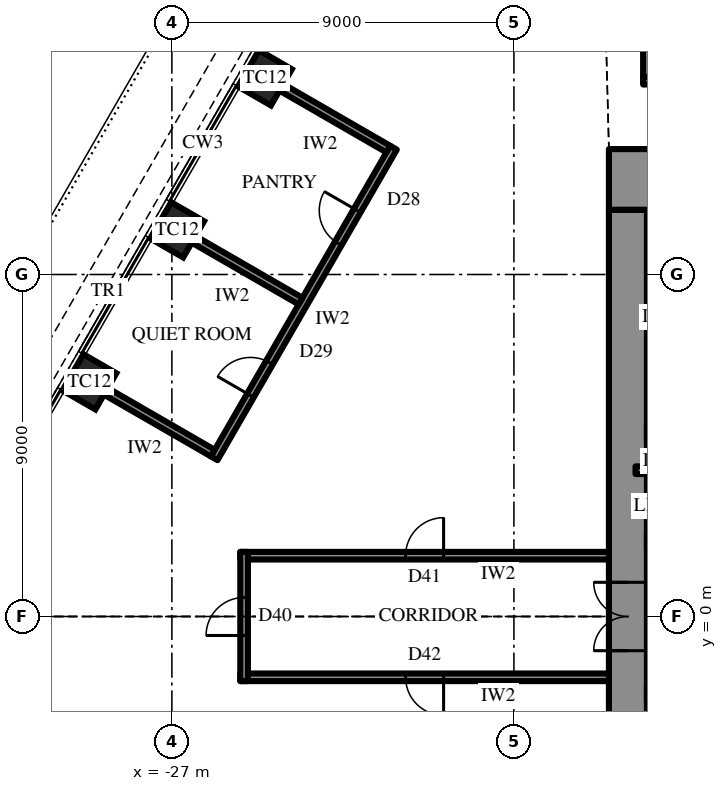
"""IFC4 building model, lengths in metres.
Left out: names, types, materials, properties, quantities, classifications, styles, units other than length and angle.
Written with IfcOpenShell. Run it as: python <this file> out.ifc"""

import sys

from ifc_helpers import new_model, si_unit, direction, frame, frame_2d, origin, origin_2d, place, context, subcontext, project, spatial, rectangle, extrude, element, fill, save


model = new_model("IFC4")
c1 = context("Model", 3, precision=1e-05, world=origin(), true_north=direction((0.0, 1.0)))
c2 = subcontext(c1, "Body", "Model", "MODEL_VIEW")
j1 = project(units=[si_unit("LENGTHUNIT", "METRE"), si_unit("PLANEANGLEUNIT", "RADIAN")], contexts=[c1])
p1 = place(None, origin())
s1 = spatial("IfcSite", under=j1, at=p1, CompositionType="ELEMENT")
p2 = place(p1, origin())
s2 = spatial("IfcBuilding", under=s1, at=p2, CompositionType="ELEMENT")
p3 = place(p2, frame((0.0, 0.0, 282.7)))
s3 = spatial("IfcBuildingStorey", under=s2, at=p3, CompositionType="ELEMENT", Elevation=282.7)
for number, where, z_axis, x_axis in (
    (1, (-24.552, 14.175, 0.0), (0.0, 0.0, 1.0), (-0.5, -0.866, 0.0)),
    (2, (-26.861, 10.175, 0.0), (0.0, 0.0, 1.0), (-0.5, -0.866, 0.0)),
    (3, (-29.171, 6.175, 0.0), (0.0, 0.0, 1.0), (-0.5, -0.866, 0.0)),
):
    element("IfcColumn", number, at=place(p3, frame(where, z_axis=z_axis, x_axis=x_axis)), inside=s3, PredefinedType="COLUMN", context=c2, shape_type="SweptSolid", body=[
        extrude(rectangle(XDim=1.1, YDim=1.0, at=origin_2d()), origin(), (0.0, 0.0, 1.0), 4.2),
    ])
p4 = place(p3, frame((-15.5, 11.5, 0.0), z_axis=(0.0, 0.0, 1.0), x_axis=(1.0, 0.0, 0.0)))
e4 = element("IfcWall", 4, at=p4, inside=s3, PredefinedType="SHEAR", context=c2, shape_type="SweptSolid", body=[
    extrude(rectangle(XDim=31.0, YDim=1.6, at=frame_2d((15.5, 0.0))), origin(), (0.0, 0.0, 1.0), 4.2),
])
p5 = place(p4, frame((16.35, 0.0, 0.0)))
e5 = element("IfcOpeningElement", 5, at=p5, cuts=e4, PredefinedType="OPENING", context=c2, shape_type="SweptSolid", body=[
    extrude(rectangle(XDim=0.9, YDim=2.2, at=frame_2d((0.45, 1.1))), frame((0.0, 0.81, 0.0), z_axis=(0.0, -1.0, 0.0), x_axis=(1.0, 0.0, 0.0)), (0.0, 0.0, 1.0), 1.62),
])
p6 = place(p4, frame((19.35, 0.0, 0.0)))
e6 = element("IfcOpeningElement", 6, at=p6, cuts=e4, PredefinedType="OPENING", context=c2, shape_type="SweptSolid", body=[
    extrude(rectangle(XDim=0.9, YDim=2.2, at=frame_2d((0.45, 1.1))), frame((0.0, 0.81, 0.0), z_axis=(0.0, -1.0, 0.0), x_axis=(1.0, 0.0, 0.0)), (0.0, 0.0, 1.0), 1.62),
])
p7 = place(p4, frame((22.4, 0.0, 0.0)))
e7 = element("IfcOpeningElement", 7, at=p7, cuts=e4, PredefinedType="OPENING", context=c2, shape_type="SweptSolid", body=[
    extrude(rectangle(XDim=1.0, YDim=2.2, at=frame_2d((0.5, 1.1))), frame((0.0, 0.81, 0.0), z_axis=(0.0, -1.0, 0.0), x_axis=(1.0, 0.0, 0.0)), (0.0, 0.0, 1.0), 1.62),
])
p8 = place(p4, frame((1.65, 0.0, 0.0)))
e8 = element("IfcOpeningElement", 8, at=p8, cuts=e4, PredefinedType="OPENING", context=c2, shape_type="SweptSolid", body=[
    extrude(rectangle(XDim=0.9, YDim=2.2, at=frame_2d((0.45, 1.1))), frame((0.0, 0.81, 0.0), z_axis=(0.0, -1.0, 0.0), x_axis=(1.0, 0.0, 0.0)), (0.0, 0.0, 1.0), 1.62),
])
p9 = place(p4, frame((4.65, 0.0, 0.0)))
e9 = element("IfcOpeningElement", 9, at=p9, cuts=e4, PredefinedType="OPENING", context=c2, shape_type="SweptSolid", body=[
    extrude(rectangle(XDim=0.9, YDim=2.2, at=frame_2d((0.45, 1.1))), frame((0.0, 0.81, 0.0), z_axis=(0.0, -1.0, 0.0), x_axis=(1.0, 0.0, 0.0)), (0.0, 0.0, 1.0), 1.62),
])
p10 = place(p4, frame((25.45, 0.0, 0.0)))
e10 = element("IfcOpeningElement", 10, at=p10, cuts=e4, PredefinedType="OPENING", context=c2, shape_type="SweptSolid", body=[
    extrude(rectangle(XDim=0.9, YDim=2.2, at=frame_2d((0.45, 1.1))), frame((0.0, 0.81, 0.0), z_axis=(0.0, -1.0, 0.0), x_axis=(1.0, 0.0, 0.0)), (0.0, 0.0, 1.0), 1.62),
])
p11 = place(p4, frame((28.45, 0.0, 0.0)))
e11 = element("IfcOpeningElement", 11, at=p11, cuts=e4, PredefinedType="OPENING", context=c2, shape_type="SweptSolid", body=[
    extrude(rectangle(XDim=0.9, YDim=2.2, at=frame_2d((0.45, 1.1))), frame((0.0, 0.81, 0.0), z_axis=(0.0, -1.0, 0.0), x_axis=(1.0, 0.0, 0.0)), (0.0, 0.0, 1.0), 1.62),
])
p12 = place(p3, frame((-15.0, 10.7, 0.0), z_axis=(0.0, 0.0, 1.0), x_axis=(0.0, -1.0, 0.0)))
e12 = element("IfcWall", 12, at=p12, inside=s3, PredefinedType="SHEAR", context=c2, shape_type="SweptSolid", body=[
    extrude(rectangle(XDim=21.4, YDim=1.0, at=frame_2d((10.7, 0.0))), origin(), (0.0, 0.0, 1.0), 4.2),
])
p13 = place(p12, frame((9.8, 0.0, 0.0)))
e13 = element("IfcOpeningElement", 13, at=p13, cuts=e12, PredefinedType="OPENING", context=c2, shape_type="SweptSolid", body=[
    extrude(rectangle(XDim=1.8, YDim=2.4, at=frame_2d((0.9, 1.2))), frame((0.0, 0.51, 0.0), z_axis=(0.0, -1.0, 0.0), x_axis=(1.0, 0.0, 0.0)), (0.0, 0.0, 1.0), 1.02),
])
p14 = place(p3, frame((-12.3, -2.0, 0.0), z_axis=(0.0, 0.0, 1.0), x_axis=(-1.0, 0.0, 0.0)))
e14 = element("IfcWall", 14, at=p14, inside=s3, PredefinedType="SHEAR", context=c2, shape_type="SweptSolid", body=[
    extrude(rectangle(XDim=2.2, YDim=0.5, at=frame_2d((1.1, 0.0))), origin(), (0.0, 0.0, 1.0), 4.2),
])
p15 = place(p14, frame((0.8, 0.0, 0.0)))
e15 = element("IfcOpeningElement", 15, at=p15, cuts=e14, PredefinedType="OPENING", context=c2, shape_type="SweptSolid", body=[
    extrude(rectangle(XDim=0.9, YDim=2.2, at=frame_2d((0.45, 1.1))), frame((0.0, 0.26, 0.0), z_axis=(0.0, -1.0, 0.0), x_axis=(1.0, 0.0, 0.0)), (0.0, 0.0, 1.0), 0.52),
])
p16 = place(p3, frame((-14.8, 3.85, 0.0), z_axis=(0.0, 0.0, 1.0), x_axis=(1.0, 0.0, 0.0)))
e16 = element("IfcWall", 16, at=p16, inside=s3, PredefinedType="PARTITIONING", context=c2, shape_type="SweptSolid", body=[
    extrude(rectangle(XDim=2.5, YDim=0.2, at=frame_2d((1.25, 0.0))), origin(), (0.0, 0.0, 1.0), 4.0),
])
p17 = place(p3, frame((-14.6, 14.1, 0.0), z_axis=(0.0, 0.0, 1.0), x_axis=(1.0, 0.0, 0.0)))
e17 = element("IfcWall", 17, at=p17, inside=s3, PredefinedType="PARTITIONING", context=c2, shape_type="SweptSolid", body=[
    extrude(rectangle(XDim=29.2, YDim=0.2, at=frame_2d((14.6, 0.0))), origin(), (0.0, 0.0, 1.0), 4.0),
])
p18 = place(p3, frame((-14.5, 14.2, 0.0), z_axis=(0.0, 0.0, 1.0), x_axis=(0.0, 1.0, 0.0)))
e18 = element("IfcWall", 18, at=p18, inside=s3, PredefinedType="PARTITIONING", context=c2, shape_type="SweptSolid", body=[
    extrude(rectangle(XDim=3.8, YDim=0.2, at=frame_2d((1.9, 0.0))), origin(), (0.0, 0.0, 1.0), 4.0),
])
p19 = place(p3, frame((-21.168, 12.337, 0.0), z_axis=(0.0, 0.0, 1.0), x_axis=(-0.499989672313, -0.866031366395, 0.0)))
e19 = element("IfcWall", 19, at=p19, inside=s3, PredefinedType="PARTITIONING", context=c2, shape_type="SweptSolid", body=[
    extrude(rectangle(XDim=9.438, YDim=0.2, at=frame_2d((4.719, 0.0))), origin(), (0.0, 0.0, 1.0), 4.0),
])
p20 = place(p19, frame((1.909, 0.0, 0.0)))
e20 = element("IfcOpeningElement", 20, at=p20, cuts=e19, PredefinedType="OPENING", context=c2, shape_type="SweptSolid", body=[
    extrude(rectangle(XDim=1.0, YDim=2.2, at=frame_2d((0.5, 1.1))), frame((0.0, 0.11, 0.0), z_axis=(0.0, -1.0, 0.0), x_axis=(1.0, 0.0, 0.0)), (0.0, 0.0, 1.0), 0.22),
])
p21 = place(p19, frame((6.528, 0.0, 0.0)))
e21 = element("IfcOpeningElement", 21, at=p21, cuts=e19, PredefinedType="OPENING", context=c2, shape_type="SweptSolid", body=[
    extrude(rectangle(XDim=1.0, YDim=2.2, at=frame_2d((0.5, 1.1))), frame((0.0, 0.11, 0.0), z_axis=(0.0, -1.0, 0.0), x_axis=(1.0, 0.0, 0.0)), (0.0, 0.0, 1.0), 0.22),
])
for number, where, z_axis, x_axis in (
    (22, (-21.304, 12.3, 0.0), (0.0, 0.0, 1.0), (-0.866, 0.5, 0.0)),
    (23, (-23.614, 8.3, 0.0), (0.0, 0.0, 1.0), (-0.866, 0.5, 0.0)),
    (24, (-25.923, 4.3, 0.0), (0.0, 0.0, 1.0), (-0.866, 0.5, 0.0)),
):
    element("IfcWall", number, at=place(p3, frame(where, z_axis=z_axis, x_axis=x_axis)), inside=s3, PredefinedType="PARTITIONING", context=c2, shape_type="SweptSolid", body=[
        extrude(rectangle(XDim=3.25, YDim=0.2, at=frame_2d((1.625, 0.0))), origin(), (0.0, 0.0, 1.0), 3.082),
    ])
p22 = place(p3, frame((-15.5, 1.6, 0.0), z_axis=(0.0, 0.0, 1.0), x_axis=(-1.0, 0.0, 0.0)))
e25 = element("IfcWall", 25, at=p22, inside=s3, PredefinedType="PARTITIONING", context=c2, shape_type="SweptSolid", body=[
    extrude(rectangle(XDim=9.7, YDim=0.2, at=frame_2d((4.85, 0.0))), origin(), (0.0, 0.0, 1.0), 4.0),
])
p23 = place(p22, frame((4.35, 0.0, 0.0)))
e26 = element("IfcOpeningElement", 26, at=p23, cuts=e25, PredefinedType="OPENING", context=c2, shape_type="SweptSolid", body=[
    extrude(rectangle(XDim=1.0, YDim=2.2, at=frame_2d((0.5, 1.1))), frame((0.0, 0.11, 0.0), z_axis=(0.0, -1.0, 0.0), x_axis=(1.0, 0.0, 0.0)), (0.0, 0.0, 1.0), 0.22),
])
p24 = place(p3, frame((-15.5, -1.6, 0.0), z_axis=(0.0, 0.0, 1.0), x_axis=(-1.0, 0.0, 0.0)))
e27 = element("IfcWall", 27, at=p24, inside=s3, PredefinedType="PARTITIONING", context=c2, shape_type="SweptSolid", body=[
    extrude(rectangle(XDim=9.7, YDim=0.2, at=frame_2d((4.85, 0.0))), origin(), (0.0, 0.0, 1.0), 4.0),
])
p25 = place(p24, frame((4.35, 0.0, 0.0)))
e28 = element("IfcOpeningElement", 28, at=p25, cuts=e27, PredefinedType="OPENING", context=c2, shape_type="SweptSolid", body=[
    extrude(rectangle(XDim=1.0, YDim=2.2, at=frame_2d((0.5, 1.1))), frame((0.0, 0.11, 0.0), z_axis=(0.0, -1.0, 0.0), x_axis=(1.0, 0.0, 0.0)), (0.0, 0.0, 1.0), 0.22),
])
p26 = place(p3, frame((-25.1, -1.7, 0.0), z_axis=(0.0, 0.0, 1.0), x_axis=(0.0, 1.0, 0.0)))
e29 = element("IfcWall", 29, at=p26, inside=s3, PredefinedType="PARTITIONING", context=c2, shape_type="SweptSolid", body=[
    extrude(rectangle(XDim=3.4, YDim=0.2, at=frame_2d((1.7, 0.0))), origin(), (0.0, 0.0, 1.0), 4.0),
])
p27 = place(p26, frame((1.2, 0.0, 0.0)))
e30 = element("IfcOpeningElement", 30, at=p27, cuts=e29, PredefinedType="OPENING", context=c2, shape_type="SweptSolid", body=[
    extrude(rectangle(XDim=1.0, YDim=2.2, at=frame_2d((0.5, 1.1))), frame((0.0, 0.11, 0.0), z_axis=(0.0, -1.0, 0.0), x_axis=(1.0, 0.0, 0.0)), (0.0, 0.0, 1.0), 0.22),
])
p28 = place(p13, frame((1.8, 0.0, 0.0), z_axis=(0.0, 0.0, 1.0), x_axis=(-1.0, 0.0, 0.0)))
e31 = element("IfcDoor", 31, at=p28, inside=s3, OperationType="DOUBLE_DOOR_SINGLE_SWING", PredefinedType="DOOR", context=c2, shape_type="SweptSolid", body=[
    extrude(rectangle(XDim=1.8, YDim=2.4, at=frame_2d((0.9, 1.2))), frame((0.0, 0.025, 0.0), z_axis=(0.0, -1.0, 0.0), x_axis=(1.0, 0.0, 0.0)), (0.0, 0.0, 1.0), 0.05),
])
fill(e13, e31)
p29 = place(p20, frame((1.0, 0.0, 0.0), z_axis=(0.0, 0.0, 1.0), x_axis=(-1.0, 0.0, 0.0)))
e32 = element("IfcDoor", 32, at=p29, inside=s3, OperationType="SINGLE_SWING_LEFT", PredefinedType="DOOR", context=c2, shape_type="SweptSolid", body=[
    extrude(rectangle(XDim=1.0, YDim=2.2, at=frame_2d((0.5, 1.1))), frame((0.0, 0.025, 0.0), z_axis=(0.0, -1.0, 0.0), x_axis=(1.0, 0.0, 0.0)), (0.0, 0.0, 1.0), 0.05),
])
fill(e20, e32)
p30 = place(p21, frame((1.0, 0.0, 0.0), z_axis=(0.0, 0.0, 1.0), x_axis=(-1.0, 0.0, 0.0)))
e33 = element("IfcDoor", 33, at=p30, inside=s3, OperationType="SINGLE_SWING_RIGHT", PredefinedType="DOOR", context=c2, shape_type="SweptSolid", body=[
    extrude(rectangle(XDim=1.0, YDim=2.2, at=frame_2d((0.5, 1.1))), frame((0.0, 0.025, 0.0), z_axis=(0.0, -1.0, 0.0), x_axis=(1.0, 0.0, 0.0)), (0.0, 0.0, 1.0), 0.05),
])
fill(e21, e33)
p31 = place(p23, frame((1.0, 0.0, 0.0), z_axis=(0.0, 0.0, 1.0), x_axis=(-1.0, 0.0, 0.0)))
e34 = element("IfcDoor", 34, at=p31, inside=s3, OperationType="SINGLE_SWING_LEFT", PredefinedType="DOOR", context=c2, shape_type="SweptSolid", body=[
    extrude(rectangle(XDim=1.0, YDim=2.2, at=frame_2d((0.5, 1.1))), frame((0.0, 0.025, 0.0), z_axis=(0.0, -1.0, 0.0), x_axis=(1.0, 0.0, 0.0)), (0.0, 0.0, 1.0), 0.05),
])
fill(e26, e34)
p32 = place(p25, origin())
e35 = element("IfcDoor", 35, at=p32, inside=s3, OperationType="SINGLE_SWING_RIGHT", PredefinedType="DOOR", context=c2, shape_type="SweptSolid", body=[
    extrude(rectangle(XDim=1.0, YDim=2.2, at=frame_2d((0.5, 1.1))), frame((0.0, 0.025, 0.0), z_axis=(0.0, -1.0, 0.0), x_axis=(1.0, 0.0, 0.0)), (0.0, 0.0, 1.0), 0.05),
])
fill(e28, e35)
p33 = place(p27, origin())
e36 = element("IfcDoor", 36, at=p33, inside=s3, OperationType="SINGLE_SWING_RIGHT", PredefinedType="DOOR", context=c2, shape_type="SweptSolid", body=[
    extrude(rectangle(XDim=1.0, YDim=2.2, at=frame_2d((0.5, 1.1))), frame((0.0, 0.025, 0.0), z_axis=(0.0, -1.0, 0.0), x_axis=(1.0, 0.0, 0.0)), (0.0, 0.0, 1.0), 0.05),
])
fill(e30, e36)
save(model, sys.argv[1])
